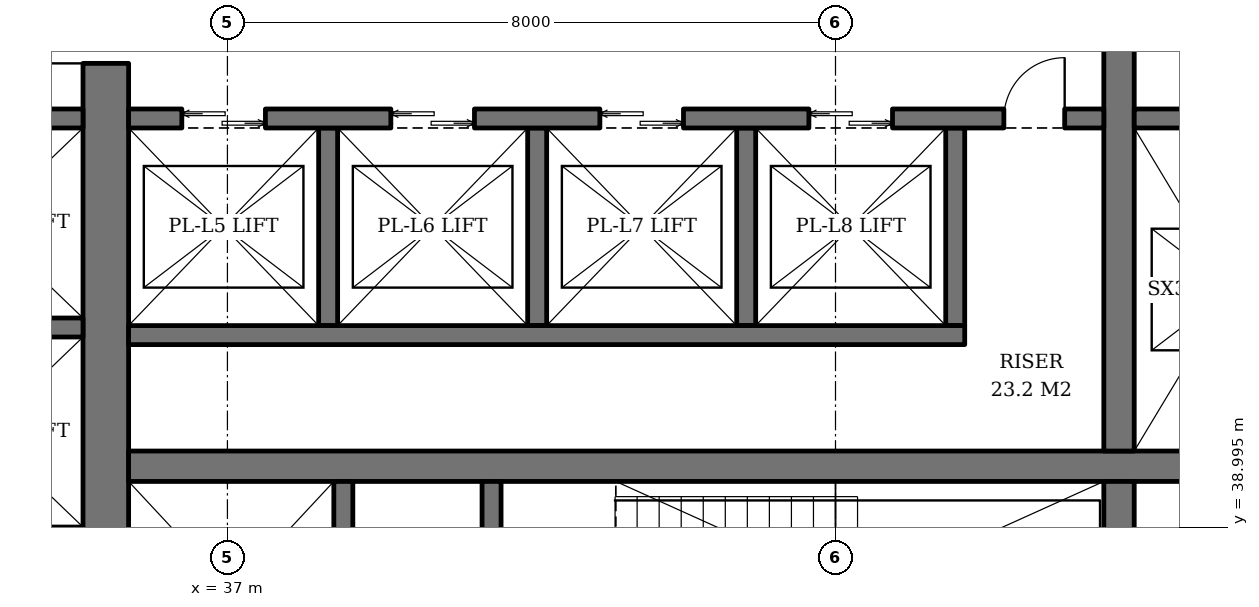
"""IFC4 building model, lengths in metres.
Left out: names, types, materials, properties, quantities, classifications, styles, units other than length and angle.
Written with IfcOpenShell. Run it as: python <this file> out.ifc"""

import sys

from ifc_helpers import new_model, si_unit, direction, frame, frame_2d, origin, place, context, subcontext, project, spatial, rectangle, extrude, element, fill, save


model = new_model("IFC4")
c1 = context("Model", 3, precision=1e-05, world=origin(), true_north=direction((0.0, 1.0)))
c2 = subcontext(c1, "Body", "Model", "MODEL_VIEW")
j1 = project(units=[si_unit("LENGTHUNIT", "METRE"), si_unit("PLANEANGLEUNIT", "RADIAN")], contexts=[c1])
p1 = place(None, origin())
s1 = spatial("IfcSite", under=j1, at=p1, CompositionType="ELEMENT")
p2 = place(p1, origin())
s2 = spatial("IfcBuilding", under=s1, at=p2, CompositionType="ELEMENT")
p3 = place(p2, frame((0.0, 0.0, 32.4)))
s3 = spatial("IfcBuildingStorey", under=s2, at=p3, CompositionType="ELEMENT", Elevation=32.4)
p4 = place(p3, frame((35.4, 36.7, 0.0), z_axis=(0.0, 0.0, 1.0), x_axis=(0.0, 1.0, 0.0)))
e1 = element("IfcWall", 1, at=p4, inside=s3, PredefinedType="SHEAR", context=c2, shape_type="SweptSolid", body=[
    extrude(rectangle(XDim=18.6, YDim=0.6, at=frame_2d((9.3, 0.0))), origin(), (0.0, 0.0, 1.0), 3.8),
])
p5 = place(p4, frame((8.4, 0.0, 0.0)))
e2 = element("IfcOpeningElement", 2, at=p5, cuts=e1, PredefinedType="OPENING", context=c2, shape_type="SweptSolid", body=[
    extrude(rectangle(XDim=1.8, YDim=2.4, at=frame_2d((0.9, 1.2))), frame((0.0, 0.31, 0.0), z_axis=(0.0, -1.0, 0.0), x_axis=(1.0, 0.0, 0.0)), (0.0, 0.0, 1.0), 0.62),
])
p6 = place(p3, frame((35.7, 39.8, 0.0), z_axis=(0.0, 0.0, 1.0), x_axis=(1.0, 0.0, 0.0)))
e3 = element("IfcWall", 3, at=p6, inside=s3, PredefinedType="SHEAR", context=c2, shape_type="SweptSolid", body=[
    extrude(rectangle(XDim=18.6, YDim=0.4, at=frame_2d((9.3, 0.0))), origin(), (0.0, 0.0, 1.0), 3.8),
])
p7 = place(p3, frame((48.73, 36.7, 0.0), z_axis=(0.0, 0.0, 1.0), x_axis=(0.0, 1.0, 0.0)))
e4 = element("IfcWall", 4, at=p7, inside=s3, PredefinedType="SHEAR", context=c2, shape_type="SweptSolid", body=[
    extrude(rectangle(XDim=2.9, YDim=0.4, at=frame_2d((1.45, 0.0))), origin(), (0.0, 0.0, 1.0), 3.8),
])
p8 = place(p3, frame((48.73, 40.0, 0.0), z_axis=(0.0, 0.0, 1.0), x_axis=(0.0, 1.0, 0.0)))
e5 = element("IfcWall", 5, at=p8, inside=s3, PredefinedType="SHEAR", context=c2, shape_type="SweptSolid", body=[
    extrude(rectangle(XDim=12.0, YDim=0.4, at=frame_2d((6.0, 0.0))), origin(), (0.0, 0.0, 1.0), 3.8),
])
p9 = place(p3, frame((38.525, 36.7, 0.0), z_axis=(0.0, 0.0, 1.0), x_axis=(0.0, 1.0, 0.0)))
e6 = element("IfcWall", 6, at=p9, inside=s3, PredefinedType="SHEAR", context=c2, shape_type="SweptSolid", body=[
    extrude(rectangle(XDim=2.9, YDim=0.25, at=frame_2d((1.45, 0.0))), origin(), (0.0, 0.0, 1.0), 3.8),
])
p10 = place(p9, frame((0.8, 0.0, 0.0)))
e7 = element("IfcOpeningElement", 7, at=p10, cuts=e6, PredefinedType="OPENING", context=c2, shape_type="SweptSolid", body=[
    extrude(rectangle(XDim=1.3, YDim=2.2, at=frame_2d((0.65, 1.1))), frame((0.0, 0.135, 0.0), z_axis=(0.0, -1.0, 0.0), x_axis=(1.0, 0.0, 0.0)), (0.0, 0.0, 1.0), 0.27),
])
p11 = place(p3, frame((40.475, 36.7, 0.0), z_axis=(0.0, 0.0, 1.0), x_axis=(0.0, 1.0, 0.0)))
e8 = element("IfcWall", 8, at=p11, inside=s3, PredefinedType="SHEAR", context=c2, shape_type="SweptSolid", body=[
    extrude(rectangle(XDim=2.9, YDim=0.25, at=frame_2d((1.45, 0.0))), origin(), (0.0, 0.0, 1.0), 3.8),
])
p12 = place(p11, frame((0.75, 0.0, 0.0)))
e9 = element("IfcOpeningElement", 9, at=p12, cuts=e8, PredefinedType="OPENING", context=c2, shape_type="SweptSolid", body=[
    extrude(rectangle(XDim=1.2, YDim=2.1, at=frame_2d((0.6, 1.05))), frame((0.0, 0.135, 0.0), z_axis=(0.0, -1.0, 0.0), x_axis=(1.0, 0.0, 0.0)), (0.0, 0.0, 1.0), 0.27),
])
for number, where, z_axis, x_axis in (
    (10, (38.325, 44.25, 0.0), (0.0, 0.0, 1.0), (0.0, -1.0, 0.0)),
    (11, (41.075, 44.25, 0.0), (0.0, 0.0, 1.0), (0.0, -1.0, 0.0)),
    (12, (43.825, 44.25, 0.0), (0.0, 0.0, 1.0), (0.0, -1.0, 0.0)),
    (13, (46.575, 44.25, 0.0), (0.0, 0.0, 1.0), (0.0, -1.0, 0.0)),
):
    element("IfcWall", number, at=place(p3, frame(where, z_axis=z_axis, x_axis=x_axis)), inside=s3, PredefinedType="SHEAR", context=c2, shape_type="SweptSolid", body=[
        extrude(rectangle(XDim=2.6, YDim=0.25, at=frame_2d((1.3, 0.0))), origin(), (0.0, 0.0, 1.0), 3.8),
    ])
p13 = place(p3, frame((35.7, 41.525, 0.0), z_axis=(0.0, 0.0, 1.0), x_axis=(1.0, 0.0, 0.0)))
e14 = element("IfcWall", 14, at=p13, inside=s3, PredefinedType="SHEAR", context=c2, shape_type="SweptSolid", body=[
    extrude(rectangle(XDim=11.0, YDim=0.25, at=frame_2d((5.5, 0.0))), origin(), (0.0, 0.0, 1.0), 3.8),
])
p14 = place(p3, frame((35.7, 44.375, 0.0), z_axis=(0.0, 0.0, 1.0), x_axis=(1.0, 0.0, 0.0)))
e15 = element("IfcWall", 15, at=p14, inside=s3, PredefinedType="SHEAR", context=c2, shape_type="SweptSolid", body=[
    extrude(rectangle(XDim=12.83, YDim=0.25, at=frame_2d((6.415, 0.0))), origin(), (0.0, 0.0, 1.0), 3.8),
])
p15 = place(p14, frame((0.7, 0.0, 0.0)))
e16 = element("IfcOpeningElement", 16, at=p15, cuts=e15, PredefinedType="OPENING", context=c2, shape_type="SweptSolid", body=[
    extrude(rectangle(XDim=1.1, YDim=2.2, at=frame_2d((0.55, 1.1))), frame((0.0, 0.135, 0.0), z_axis=(0.0, -1.0, 0.0), x_axis=(1.0, 0.0, 0.0)), (0.0, 0.0, 1.0), 0.27),
])
p16 = place(p14, frame((3.45, 0.0, 0.0)))
e17 = element("IfcOpeningElement", 17, at=p16, cuts=e15, PredefinedType="OPENING", context=c2, shape_type="SweptSolid", body=[
    extrude(rectangle(XDim=1.1, YDim=2.2, at=frame_2d((0.55, 1.1))), frame((0.0, 0.135, 0.0), z_axis=(0.0, -1.0, 0.0), x_axis=(1.0, 0.0, 0.0)), (0.0, 0.0, 1.0), 0.27),
])
p17 = place(p14, frame((6.2, 0.0, 0.0)))
e18 = element("IfcOpeningElement", 18, at=p17, cuts=e15, PredefinedType="OPENING", context=c2, shape_type="SweptSolid", body=[
    extrude(rectangle(XDim=1.1, YDim=2.2, at=frame_2d((0.55, 1.1))), frame((0.0, 0.135, 0.0), z_axis=(0.0, -1.0, 0.0), x_axis=(1.0, 0.0, 0.0)), (0.0, 0.0, 1.0), 0.27),
])
p18 = place(p14, frame((8.95, 0.0, 0.0)))
e19 = element("IfcOpeningElement", 19, at=p18, cuts=e15, PredefinedType="OPENING", context=c2, shape_type="SweptSolid", body=[
    extrude(rectangle(XDim=1.1, YDim=2.2, at=frame_2d((0.55, 1.1))), frame((0.0, 0.135, 0.0), z_axis=(0.0, -1.0, 0.0), x_axis=(1.0, 0.0, 0.0)), (0.0, 0.0, 1.0), 0.27),
])
p19 = place(p14, frame((11.515, 0.0, 0.0)))
e20 = element("IfcOpeningElement", 20, at=p19, cuts=e15, PredefinedType="OPENING", context=c2, shape_type="SweptSolid", body=[
    extrude(rectangle(XDim=0.8, YDim=2.0, at=frame_2d((0.4, 1.0))), frame((0.0, 0.135, 0.0), z_axis=(0.0, -1.0, 0.0), x_axis=(1.0, 0.0, 0.0)), (0.0, 0.0, 1.0), 0.27),
])
p20 = place(p3, frame((48.93, 44.375, 0.0), z_axis=(0.0, 0.0, 1.0), x_axis=(1.0, 0.0, 0.0)))
e21 = element("IfcWall", 21, at=p20, inside=s3, PredefinedType="SHEAR", context=c2, shape_type="SweptSolid", body=[
    extrude(rectangle(XDim=5.37, YDim=0.25, at=frame_2d((2.685, 0.0))), origin(), (0.0, 0.0, 1.0), 3.8),
])
for number, where, z_axis, x_axis in (
    (22, (32.5, 41.625, 0.0), (0.0, 0.0, 1.0), (1.0, 0.0, 0.0)),
    (23, (32.5, 44.375, 0.0), (0.0, 0.0, 1.0), (1.0, 0.0, 0.0)),
):
    element("IfcWall", number, at=place(p3, frame(where, z_axis=z_axis, x_axis=x_axis)), inside=s3, PredefinedType="SHEAR", context=c2, shape_type="SweptSolid", body=[
        extrude(rectangle(XDim=2.6, YDim=0.25, at=frame_2d((1.3, 0.0))), origin(), (0.0, 0.0, 1.0), 3.8),
    ])
p21 = place(p15, origin())
e24 = element("IfcDoor", 24, at=p21, inside=s3, OperationType="DOUBLE_DOOR_SLIDING", PredefinedType="DOOR", context=c2, shape_type="SweptSolid", body=[
    extrude(rectangle(XDim=1.1, YDim=2.2, at=frame_2d((0.55, 1.1))), frame((0.0, 0.025, 0.0), z_axis=(0.0, -1.0, 0.0), x_axis=(1.0, 0.0, 0.0)), (0.0, 0.0, 1.0), 0.05),
])
fill(e16, e24)
p22 = place(p16, origin())
e25 = element("IfcDoor", 25, at=p22, inside=s3, OperationType="DOUBLE_DOOR_SLIDING", PredefinedType="DOOR", context=c2, shape_type="SweptSolid", body=[
    extrude(rectangle(XDim=1.1, YDim=2.2, at=frame_2d((0.55, 1.1))), frame((0.0, 0.025, 0.0), z_axis=(0.0, -1.0, 0.0), x_axis=(1.0, 0.0, 0.0)), (0.0, 0.0, 1.0), 0.05),
])
fill(e17, e25)
p23 = place(p17, origin())
e26 = element("IfcDoor", 26, at=p23, inside=s3, OperationType="DOUBLE_DOOR_SLIDING", PredefinedType="DOOR", context=c2, shape_type="SweptSolid", body=[
    extrude(rectangle(XDim=1.1, YDim=2.2, at=frame_2d((0.55, 1.1))), frame((0.0, 0.025, 0.0), z_axis=(0.0, -1.0, 0.0), x_axis=(1.0, 0.0, 0.0)), (0.0, 0.0, 1.0), 0.05),
])
fill(e18, e26)
p24 = place(p18, origin())
e27 = element("IfcDoor", 27, at=p24, inside=s3, OperationType="DOUBLE_DOOR_SLIDING", PredefinedType="DOOR", context=c2, shape_type="SweptSolid", body=[
    extrude(rectangle(XDim=1.1, YDim=2.2, at=frame_2d((0.55, 1.1))), frame((0.0, 0.025, 0.0), z_axis=(0.0, -1.0, 0.0), x_axis=(1.0, 0.0, 0.0)), (0.0, 0.0, 1.0), 0.05),
])
fill(e19, e27)
p25 = place(p19, origin())
e28 = element("IfcDoor", 28, at=p25, inside=s3, OperationType="SINGLE_SWING_RIGHT", PredefinedType="DOOR", context=c2, shape_type="SweptSolid", body=[
    extrude(rectangle(XDim=0.8, YDim=2.0, at=frame_2d((0.4, 1.0))), frame((0.0, 0.025, 0.0), z_axis=(0.0, -1.0, 0.0), x_axis=(1.0, 0.0, 0.0)), (0.0, 0.0, 1.0), 0.05),
])
fill(e20, e28)
p26 = place(p5, origin())
e29 = element("IfcDoor", 29, at=p26, inside=s3, OperationType="DOUBLE_DOOR_SINGLE_SWING", PredefinedType="DOOR", context=c2, shape_type="SweptSolid", body=[
    extrude(rectangle(XDim=1.8, YDim=2.4, at=frame_2d((0.9, 1.2))), frame((0.0, 0.025, 0.0), z_axis=(0.0, -1.0, 0.0), x_axis=(1.0, 0.0, 0.0)), (0.0, 0.0, 1.0), 0.05),
])
fill(e2, e29)
save(model, sys.argv[1])
